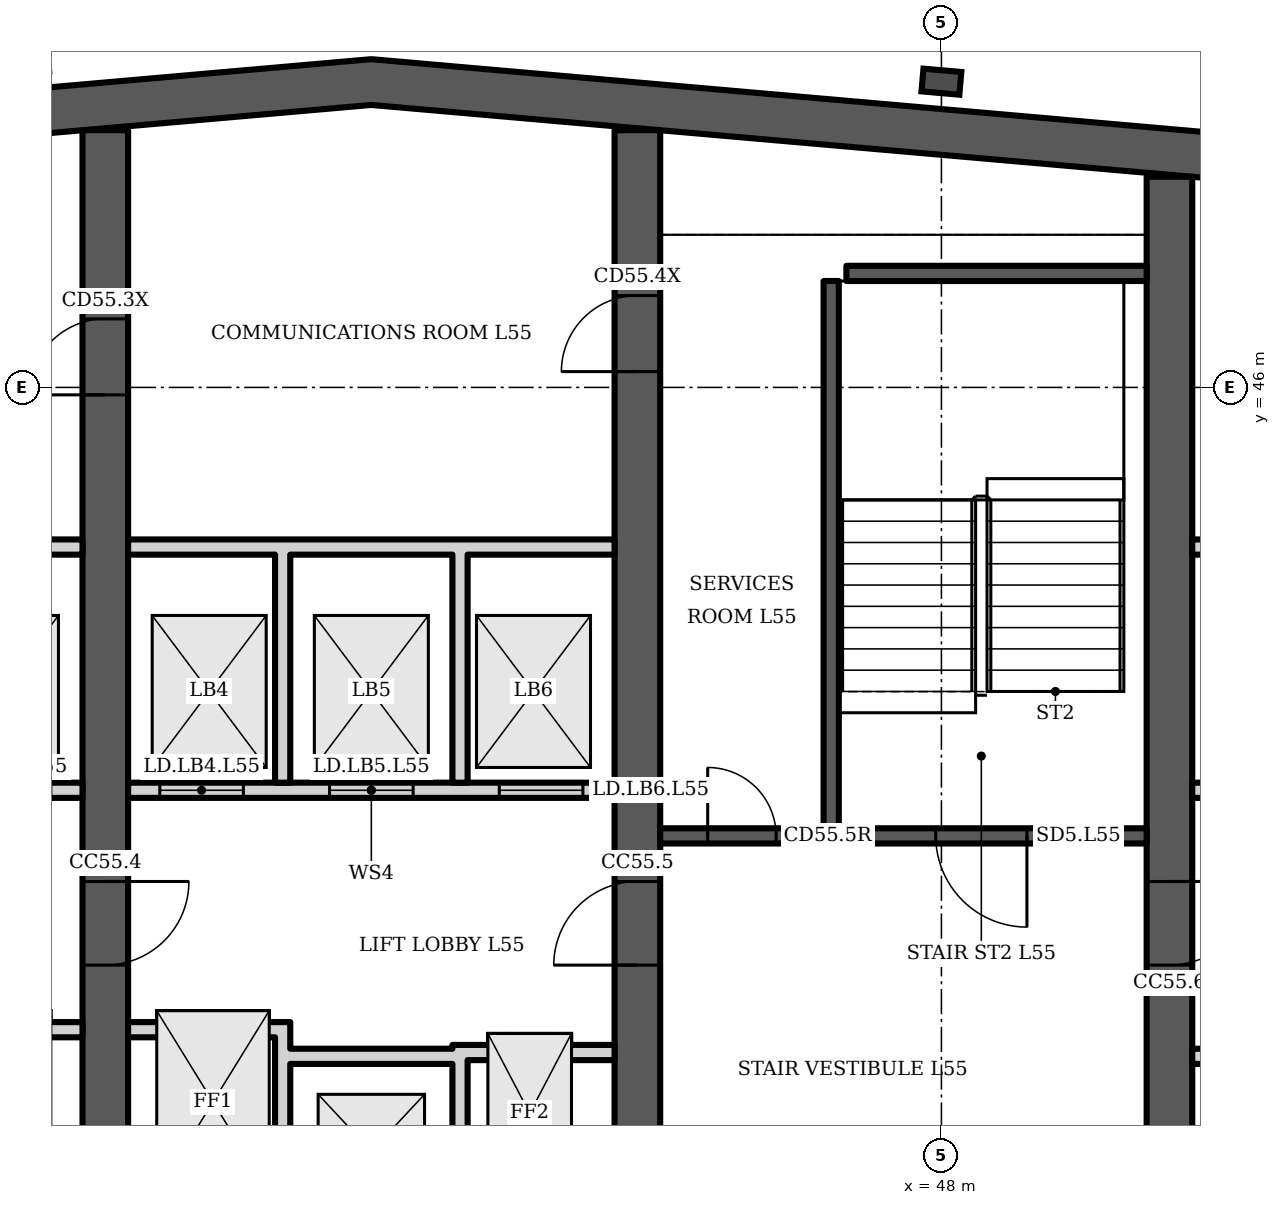
"""IFC4 building model, lengths in metres.
Left out: names, types, materials, properties, quantities, classifications, styles, units other than length and angle.
Written with IfcOpenShell. Run it as: python <this file> out.ifc"""

import sys

from ifc_helpers import new_model, si_unit, direction, frame, frame_2d, origin, origin_2d, place, context, subcontext, project, spatial, polyline, rectangle, i_section, outline, extrude, element, fill, save


model = new_model("IFC4")
c1 = context("Model", 3, precision=1e-05, world=origin(), true_north=direction((0.0, 1.0)))
c2 = subcontext(c1, "Body", "Model", "MODEL_VIEW")
j1 = project(units=[si_unit("LENGTHUNIT", "METRE"), si_unit("PLANEANGLEUNIT", "RADIAN")], contexts=[c1])
p1 = place(None, origin())
s1 = spatial("IfcSite", under=j1, at=p1, CompositionType="ELEMENT")
p2 = place(p1, origin())
s2 = spatial("IfcBuilding", under=s1, at=p2, CompositionType="ELEMENT")
p3 = place(p2, frame((0.0, 0.0, 221.5)))
s3 = spatial("IfcBuildingStorey", under=s2, at=p3, CompositionType="ELEMENT", Elevation=221.5)
p4 = place(p3, origin())
e1 = element("IfcWall", 1, at=p4, inside=s3, PredefinedType="SHEAR", context=c2, shape_type="SweptSolid", body=[
    extrude(outline(polyline([(23.0, 48.185), (40.5, 49.716), (58.0, 48.185), (58.0, 48.787), (40.5, 50.318), (23.0, 48.787), (23.0, 48.185)])), origin(), (0.0, 0.0, 1.0), 3.6),
])
p5 = place(p3, frame((37.0, 34.6, 0.0), z_axis=(0.0, 0.0, 1.0), x_axis=(0.0, 1.0, 0.0)))
e2 = element("IfcWall", 2, at=p5, inside=s3, PredefinedType="SHEAR", context=c2, shape_type="SweptSolid", body=[
    extrude(rectangle(XDim=14.784, YDim=0.6, at=frame_2d((7.392, 0.0))), origin(), (0.0, 0.0, 1.0), 3.6),
])
p6 = place(p5, frame((11.302, 0.0, 0.0)))
e3 = element("IfcOpeningElement", 3, at=p6, cuts=e2, PredefinedType="OPENING", context=c2, shape_type="SweptSolid", body=[
    extrude(rectangle(XDim=1.0, YDim=2.1, at=frame_2d((0.5, 1.05))), frame((0.0, 0.31, 0.0), z_axis=(0.0, -1.0, 0.0), x_axis=(1.0, 0.0, 0.0)), (0.0, 0.0, 1.0), 0.62),
])
p7 = place(p5, frame((3.8, 0.0, 0.0)))
e4 = element("IfcOpeningElement", 4, at=p7, cuts=e2, PredefinedType="OPENING", context=c2, shape_type="SweptSolid", body=[
    extrude(rectangle(XDim=1.1, YDim=2.1, at=frame_2d((0.55, 1.05))), frame((0.0, 0.31, 0.0), z_axis=(0.0, -1.0, 0.0), x_axis=(1.0, 0.0, 0.0)), (0.0, 0.0, 1.0), 0.62),
])
p8 = place(p3, frame((44.0, 34.6, 0.0), z_axis=(0.0, 0.0, 1.0), x_axis=(0.0, 1.0, 0.0)))
e5 = element("IfcWall", 5, at=p8, inside=s3, PredefinedType="SHEAR", context=c2, shape_type="SweptSolid", body=[
    extrude(rectangle(XDim=14.784, YDim=0.6, at=frame_2d((7.392, 0.0))), origin(), (0.0, 0.0, 1.0), 3.6),
])
p9 = place(p8, frame((11.608, 0.0, 0.0)))
e6 = element("IfcOpeningElement", 6, at=p9, cuts=e5, PredefinedType="OPENING", context=c2, shape_type="SweptSolid", body=[
    extrude(rectangle(XDim=1.0, YDim=2.1, at=frame_2d((0.5, 1.05))), frame((0.0, 0.31, 0.0), z_axis=(0.0, -1.0, 0.0), x_axis=(1.0, 0.0, 0.0)), (0.0, 0.0, 1.0), 0.62),
])
p10 = place(p8, frame((3.8, 0.0, 0.0)))
e7 = element("IfcOpeningElement", 7, at=p10, cuts=e5, PredefinedType="OPENING", context=c2, shape_type="SweptSolid", body=[
    extrude(rectangle(XDim=1.1, YDim=2.1, at=frame_2d((0.55, 1.05))), frame((0.0, 0.31, 0.0), z_axis=(0.0, -1.0, 0.0), x_axis=(1.0, 0.0, 0.0)), (0.0, 0.0, 1.0), 0.62),
])
p11 = place(p3, frame((51.0, 34.6, 0.0), z_axis=(0.0, 0.0, 1.0), x_axis=(0.0, 1.0, 0.0)))
e8 = element("IfcWall", 8, at=p11, inside=s3, PredefinedType="SHEAR", context=c2, shape_type="SweptSolid", body=[
    extrude(rectangle(XDim=14.171, YDim=0.6, at=frame_2d((7.085, 0.0))), origin(), (0.0, 0.0, 1.0), 3.6),
])
p12 = place(p11, frame((3.8, 0.0, 0.0)))
e9 = element("IfcOpeningElement", 9, at=p12, cuts=e8, PredefinedType="OPENING", context=c2, shape_type="SweptSolid", body=[
    extrude(rectangle(XDim=1.1, YDim=2.1, at=frame_2d((0.55, 1.05))), frame((0.0, 0.31, 0.0), z_axis=(0.0, -1.0, 0.0), x_axis=(1.0, 0.0, 0.0)), (0.0, 0.0, 1.0), 0.62),
])
p13 = place(p3, frame((48.0, 50.022, 0.0), z_axis=(0.0, 0.0, 1.0), x_axis=(0.087156, 0.996197, 0.0)))
e10 = element("IfcColumn", 10, at=p13, inside=s3, PredefinedType="COLUMN", context=c2, shape_type="SweptSolid", body=[
    extrude(i_section(OverallWidth=0.3, OverallDepth=0.5, WebThickness=0.014, FlangeThickness=0.028, FilletRadius=0.027, at=origin_2d()), origin(), (0.0, 0.0, 1.0), 3.6),
])
p14 = place(p3, frame((30.3, 40.7, 0.0), z_axis=(0.0, 0.0, 1.0), x_axis=(1.0, 0.0, 0.0)))
e11 = element("IfcWall", 11, at=p14, inside=s3, PredefinedType="PARTITIONING", context=c2, shape_type="SweptSolid", body=[
    extrude(rectangle(XDim=6.4, YDim=0.2, at=frame_2d((3.2, 0.0))), origin(), (0.0, 0.0, 1.0), 3.2),
])
p15 = place(p14, frame((0.417, 0.0, 0.0)))
e12 = element("IfcOpeningElement", 12, at=p15, cuts=e11, PredefinedType="OPENING", context=c2, shape_type="SweptSolid", body=[
    extrude(rectangle(XDim=1.1, YDim=2.1, at=frame_2d((0.55, 1.05))), frame((0.0, 0.11, 0.0), z_axis=(0.0, -1.0, 0.0), x_axis=(1.0, 0.0, 0.0)), (0.0, 0.0, 1.0), 0.22),
])
p16 = place(p14, frame((2.65, 0.0, 0.0)))
e13 = element("IfcOpeningElement", 13, at=p16, cuts=e11, PredefinedType="OPENING", context=c2, shape_type="SweptSolid", body=[
    extrude(rectangle(XDim=1.1, YDim=2.1, at=frame_2d((0.55, 1.05))), frame((0.0, 0.11, 0.0), z_axis=(0.0, -1.0, 0.0), x_axis=(1.0, 0.0, 0.0)), (0.0, 0.0, 1.0), 0.22),
])
p17 = place(p14, frame((4.883, 0.0, 0.0)))
e14 = element("IfcOpeningElement", 14, at=p17, cuts=e11, PredefinedType="OPENING", context=c2, shape_type="SweptSolid", body=[
    extrude(rectangle(XDim=1.1, YDim=2.1, at=frame_2d((0.55, 1.05))), frame((0.0, 0.11, 0.0), z_axis=(0.0, -1.0, 0.0), x_axis=(1.0, 0.0, 0.0)), (0.0, 0.0, 1.0), 0.22),
])
p18 = place(p3, frame((0.0, 0.0, -0.0)))
e15 = element("IfcWall", 15, at=p18, inside=s3, PredefinedType="PARTITIONING", context=c2, shape_type="SweptSolid", body=[
    extrude(outline(polyline([(34.567, 37.65), (34.767, 37.65), (36.7, 37.65), (36.7, 37.45), (34.767, 37.45), (34.767, 34.6), (34.567, 34.6), (34.567, 37.65)])), origin(), (0.0, 0.0, 1.0), 3.2),
])
p19 = place(p3, frame((0.0, 0.0, -0.0)))
e16 = element("IfcWall", 16, at=p19, inside=s3, PredefinedType="PARTITIONING", context=c2, shape_type="SweptSolid", body=[
    extrude(outline(polyline([(32.433, 40.8), (32.233, 40.8), (32.233, 43.8), (30.3, 43.8), (30.3, 44.0), (36.7, 44.0), (36.7, 43.8), (34.767, 43.8), (34.767, 40.8), (34.567, 40.8), (34.567, 43.8), (32.433, 43.8), (32.433, 40.8)])), origin(), (0.0, 0.0, 1.0), 3.2),
])
p20 = place(p3, frame((37.3, 40.7, 0.0), z_axis=(0.0, 0.0, 1.0), x_axis=(1.0, 0.0, 0.0)))
e17 = element("IfcWall", 17, at=p20, inside=s3, PredefinedType="PARTITIONING", context=c2, shape_type="SweptSolid", body=[
    extrude(rectangle(XDim=6.4, YDim=0.2, at=frame_2d((3.2, 0.0))), origin(), (0.0, 0.0, 1.0), 3.2),
])
p21 = place(p20, frame((0.417, 0.0, 0.0)))
e18 = element("IfcOpeningElement", 18, at=p21, cuts=e17, PredefinedType="OPENING", context=c2, shape_type="SweptSolid", body=[
    extrude(rectangle(XDim=1.1, YDim=2.1, at=frame_2d((0.55, 1.05))), frame((0.0, 0.11, 0.0), z_axis=(0.0, -1.0, 0.0), x_axis=(1.0, 0.0, 0.0)), (0.0, 0.0, 1.0), 0.22),
])
p22 = place(p20, frame((2.65, 0.0, 0.0)))
e19 = element("IfcOpeningElement", 19, at=p22, cuts=e17, PredefinedType="OPENING", context=c2, shape_type="SweptSolid", body=[
    extrude(rectangle(XDim=1.1, YDim=2.1, at=frame_2d((0.55, 1.05))), frame((0.0, 0.11, 0.0), z_axis=(0.0, -1.0, 0.0), x_axis=(1.0, 0.0, 0.0)), (0.0, 0.0, 1.0), 0.22),
])
p23 = place(p20, frame((4.883, 0.0, 0.0)))
e20 = element("IfcOpeningElement", 20, at=p23, cuts=e17, PredefinedType="OPENING", context=c2, shape_type="SweptSolid", body=[
    extrude(rectangle(XDim=1.1, YDim=2.1, at=frame_2d((0.55, 1.05))), frame((0.0, 0.11, 0.0), z_axis=(0.0, -1.0, 0.0), x_axis=(1.0, 0.0, 0.0)), (0.0, 0.0, 1.0), 0.22),
])
p24 = place(p3, frame((0.0, 0.0, -0.0)))
e21 = element("IfcWall", 21, at=p24, inside=s3, PredefinedType="PARTITIONING", context=c2, shape_type="SweptSolid", body=[
    extrude(outline(polyline([(41.567, 37.1), (39.433, 37.1), (39.433, 34.6), (39.233, 34.6), (39.233, 37.45), (37.3, 37.45), (37.3, 37.65), (39.233, 37.65), (39.433, 37.65), (39.433, 37.3), (41.567, 37.3), (41.567, 37.35), (41.767, 37.35), (43.7, 37.35), (43.7, 37.15), (41.767, 37.15), (41.767, 34.6), (41.567, 34.6), (41.567, 37.1)])), origin(), (0.0, 0.0, 1.0), 3.2),
])
p25 = place(p3, frame((0.0, 0.0, -0.0)))
e22 = element("IfcWall", 22, at=p25, inside=s3, PredefinedType="PARTITIONING", context=c2, shape_type="SweptSolid", body=[
    extrude(outline(polyline([(39.433, 40.8), (39.233, 40.8), (39.233, 43.8), (37.3, 43.8), (37.3, 44.0), (43.7, 44.0), (43.7, 43.8), (41.767, 43.8), (41.767, 40.8), (41.567, 40.8), (41.567, 43.8), (39.433, 43.8), (39.433, 40.8)])), origin(), (0.0, 0.0, 1.0), 3.2),
])
p26 = place(p3, frame((44.3, 40.1, 0.0), z_axis=(0.0, 0.0, 1.0), x_axis=(1.0, 0.0, 0.0)))
e23 = element("IfcWall", 23, at=p26, inside=s3, PredefinedType="SHEAR", context=c2, shape_type="SweptSolid", body=[
    extrude(rectangle(XDim=6.4, YDim=0.2, at=frame_2d((3.2, 0.0))), origin(), (0.0, 0.0, 1.0), 3.2),
])
p27 = place(p26, frame((3.625, 0.0, 0.0)))
e24 = element("IfcOpeningElement", 24, at=p27, cuts=e23, PredefinedType="OPENING", context=c2, shape_type="SweptSolid", body=[
    extrude(rectangle(XDim=1.2, YDim=2.1, at=frame_2d((0.6, 1.05))), frame((0.0, 0.11, 0.0), z_axis=(0.0, -1.0, 0.0), x_axis=(1.0, 0.0, 0.0)), (0.0, 0.0, 1.0), 0.22),
])
p28 = place(p26, frame((0.625, 0.0, 0.0)))
e25 = element("IfcOpeningElement", 25, at=p28, cuts=e23, PredefinedType="OPENING", context=c2, shape_type="SweptSolid", body=[
    extrude(rectangle(XDim=0.9, YDim=2.1, at=frame_2d((0.45, 1.05))), frame((0.0, 0.11, 0.0), z_axis=(0.0, -1.0, 0.0), x_axis=(1.0, 0.0, 0.0)), (0.0, 0.0, 1.0), 0.22),
])
p29 = place(p3, frame((46.55, 40.2, 0.0), z_axis=(0.0, 0.0, 1.0), x_axis=(0.0, 1.0, 0.0)))
e26 = element("IfcWall", 26, at=p29, inside=s3, PredefinedType="SHEAR", context=c2, shape_type="SweptSolid", body=[
    extrude(rectangle(XDim=7.2, YDim=0.2, at=frame_2d((3.6, 0.0))), origin(), (0.0, 0.0, 1.0), 3.2),
])
p30 = place(p3, frame((46.75, 47.5, 0.0), z_axis=(0.0, 0.0, 1.0), x_axis=(1.0, 0.0, 0.0)))
e27 = element("IfcWall", 27, at=p30, inside=s3, PredefinedType="SHEAR", context=c2, shape_type="SweptSolid", body=[
    extrude(rectangle(XDim=3.95, YDim=0.2, at=frame_2d((1.975, 0.0))), origin(), (0.0, 0.0, 1.0), 3.2),
])
p31 = place(p3, frame((51.3, 37.2, 0.0), z_axis=(0.0, 0.0, 1.0), x_axis=(1.0, 0.0, 0.0)))
e28 = element("IfcWall", 28, at=p31, inside=s3, PredefinedType="PARTITIONING", context=c2, shape_type="SweptSolid", body=[
    extrude(rectangle(XDim=1.933, YDim=0.2, at=frame_2d((0.967, 0.0))), origin(), (0.0, 0.0, 1.0), 3.2),
])
p32 = place(p31, frame((0.467, 0.0, 0.0)))
e29 = element("IfcOpeningElement", 29, at=p32, cuts=e28, PredefinedType="OPENING", context=c2, shape_type="SweptSolid", body=[
    extrude(rectangle(XDim=1.0, YDim=2.1, at=frame_2d((0.5, 1.05))), frame((0.0, 0.11, 0.0), z_axis=(0.0, -1.0, 0.0), x_axis=(1.0, 0.0, 0.0)), (0.0, 0.0, 1.0), 0.22),
])
p33 = place(p3, frame((51.3, 40.7, 0.0), z_axis=(0.0, 0.0, 1.0), x_axis=(1.0, 0.0, 0.0)))
e30 = element("IfcWall", 30, at=p33, inside=s3, PredefinedType="PARTITIONING", context=c2, shape_type="SweptSolid", body=[
    extrude(rectangle(XDim=6.1, YDim=0.2, at=frame_2d((3.05, 0.0))), origin(), (0.0, 0.0, 1.0), 3.2),
])
p34 = place(p33, frame((0.417, 0.0, 0.0)))
e31 = element("IfcOpeningElement", 31, at=p34, cuts=e30, PredefinedType="OPENING", context=c2, shape_type="SweptSolid", body=[
    extrude(rectangle(XDim=1.1, YDim=2.1, at=frame_2d((0.55, 1.05))), frame((0.0, 0.11, 0.0), z_axis=(0.0, -1.0, 0.0), x_axis=(1.0, 0.0, 0.0)), (0.0, 0.0, 1.0), 0.22),
])
p35 = place(p33, frame((3.617, 0.0, 0.0)))
e32 = element("IfcOpeningElement", 32, at=p35, cuts=e30, PredefinedType="OPENING", context=c2, shape_type="SweptSolid", body=[
    extrude(rectangle(XDim=1.0, YDim=2.1, at=frame_2d((0.5, 1.05))), frame((0.0, 0.11, 0.0), z_axis=(0.0, -1.0, 0.0), x_axis=(1.0, 0.0, 0.0)), (0.0, 0.0, 1.0), 0.22),
])
p36 = place(p3, frame((51.3, 43.9, 0.0), z_axis=(0.0, 0.0, 1.0), x_axis=(1.0, 0.0, 0.0)))
e33 = element("IfcWall", 33, at=p36, inside=s3, PredefinedType="PARTITIONING", context=c2, shape_type="SweptSolid", body=[
    extrude(rectangle(XDim=6.1, YDim=0.2, at=frame_2d((3.05, 0.0))), origin(), (0.0, 0.0, 1.0), 3.2),
])
p37 = place(p36, frame((3.617, 0.0, 0.0)))
e34 = element("IfcOpeningElement", 34, at=p37, cuts=e33, PredefinedType="OPENING", context=c2, shape_type="SweptSolid", body=[
    extrude(rectangle(XDim=1.0, YDim=2.1, at=frame_2d((0.5, 1.05))), frame((0.0, 0.11, 0.0), z_axis=(0.0, -1.0, 0.0), x_axis=(1.0, 0.0, 0.0)), (0.0, 0.0, 1.0), 0.22),
])
p38 = place(p6, origin())
e35 = element("IfcDoor", 35, at=p38, inside=s3, OperationType="SINGLE_SWING_LEFT", PredefinedType="DOOR", context=c2, shape_type="SweptSolid", body=[
    extrude(rectangle(XDim=1.0, YDim=2.1, at=frame_2d((0.5, 1.05))), frame((0.0, 0.025, 0.0), z_axis=(0.0, -1.0, 0.0), x_axis=(1.0, 0.0, 0.0)), (0.0, 0.0, 1.0), 0.05),
])
fill(e3, e35)
p39 = place(p21, origin())
e36 = element("IfcDoor", 36, at=p39, inside=s3, OperationType="DOUBLE_DOOR_SLIDING", PredefinedType="DOOR", context=c2, shape_type="SweptSolid", body=[
    extrude(rectangle(XDim=1.1, YDim=2.1, at=frame_2d((0.55, 1.05))), frame((0.0, 0.025, 0.0), z_axis=(0.0, -1.0, 0.0), x_axis=(1.0, 0.0, 0.0)), (0.0, 0.0, 1.0), 0.05),
])
fill(e18, e36)
p40 = place(p22, origin())
e37 = element("IfcDoor", 37, at=p40, inside=s3, OperationType="DOUBLE_DOOR_SLIDING", PredefinedType="DOOR", context=c2, shape_type="SweptSolid", body=[
    extrude(rectangle(XDim=1.1, YDim=2.1, at=frame_2d((0.55, 1.05))), frame((0.0, 0.025, 0.0), z_axis=(0.0, -1.0, 0.0), x_axis=(1.0, 0.0, 0.0)), (0.0, 0.0, 1.0), 0.05),
])
fill(e19, e37)
p41 = place(p23, origin())
e38 = element("IfcDoor", 38, at=p41, inside=s3, OperationType="DOUBLE_DOOR_SLIDING", PredefinedType="DOOR", context=c2, shape_type="SweptSolid", body=[
    extrude(rectangle(XDim=1.1, YDim=2.1, at=frame_2d((0.55, 1.05))), frame((0.0, 0.025, 0.0), z_axis=(0.0, -1.0, 0.0), x_axis=(1.0, 0.0, 0.0)), (0.0, 0.0, 1.0), 0.05),
])
fill(e20, e38)
p42 = place(p9, origin())
e39 = element("IfcDoor", 39, at=p42, inside=s3, OperationType="SINGLE_SWING_LEFT", PredefinedType="DOOR", context=c2, shape_type="SweptSolid", body=[
    extrude(rectangle(XDim=1.0, YDim=2.1, at=frame_2d((0.5, 1.05))), frame((0.0, 0.025, 0.0), z_axis=(0.0, -1.0, 0.0), x_axis=(1.0, 0.0, 0.0)), (0.0, 0.0, 1.0), 0.05),
])
fill(e6, e39)
p43 = place(p27, origin())
e40 = element("IfcDoor", 40, at=p43, inside=s3, OperationType="SINGLE_SWING_RIGHT", PredefinedType="DOOR", context=c2, shape_type="SweptSolid", body=[
    extrude(rectangle(XDim=1.2, YDim=2.1, at=frame_2d((0.6, 1.05))), frame((0.0, 0.025, 0.0), z_axis=(0.0, -1.0, 0.0), x_axis=(1.0, 0.0, 0.0)), (0.0, 0.0, 1.0), 0.05),
])
fill(e24, e40)
p44 = place(p28, origin())
e41 = element("IfcDoor", 41, at=p44, inside=s3, OperationType="SINGLE_SWING_LEFT", PredefinedType="DOOR", context=c2, shape_type="SweptSolid", body=[
    extrude(rectangle(XDim=0.9, YDim=2.1, at=frame_2d((0.45, 1.05))), frame((0.0, 0.025, 0.0), z_axis=(0.0, -1.0, 0.0), x_axis=(1.0, 0.0, 0.0)), (0.0, 0.0, 1.0), 0.05),
])
fill(e25, e41)
p45 = place(p7, origin())
e42 = element("IfcDoor", 42, at=p45, inside=s3, OperationType="SINGLE_SWING_RIGHT", PredefinedType="DOOR", context=c2, shape_type="SweptSolid", body=[
    extrude(rectangle(XDim=1.1, YDim=2.1, at=frame_2d((0.55, 1.05))), frame((0.0, 0.025, 0.0), z_axis=(0.0, -1.0, 0.0), x_axis=(1.0, 0.0, 0.0)), (0.0, 0.0, 1.0), 0.05),
])
fill(e4, e42)
p46 = place(p10, origin())
e43 = element("IfcDoor", 43, at=p46, inside=s3, OperationType="SINGLE_SWING_LEFT", PredefinedType="DOOR", context=c2, shape_type="SweptSolid", body=[
    extrude(rectangle(XDim=1.1, YDim=2.1, at=frame_2d((0.55, 1.05))), frame((0.0, 0.025, 0.0), z_axis=(0.0, -1.0, 0.0), x_axis=(1.0, 0.0, 0.0)), (0.0, 0.0, 1.0), 0.05),
])
fill(e7, e43)
p47 = place(p12, origin())
e44 = element("IfcDoor", 44, at=p47, inside=s3, OperationType="SINGLE_SWING_RIGHT", PredefinedType="DOOR", context=c2, shape_type="SweptSolid", body=[
    extrude(rectangle(XDim=1.1, YDim=2.1, at=frame_2d((0.55, 1.05))), frame((0.0, 0.025, 0.0), z_axis=(0.0, -1.0, 0.0), x_axis=(1.0, 0.0, 0.0)), (0.0, 0.0, 1.0), 0.05),
])
fill(e9, e44)
save(model, sys.argv[1])
